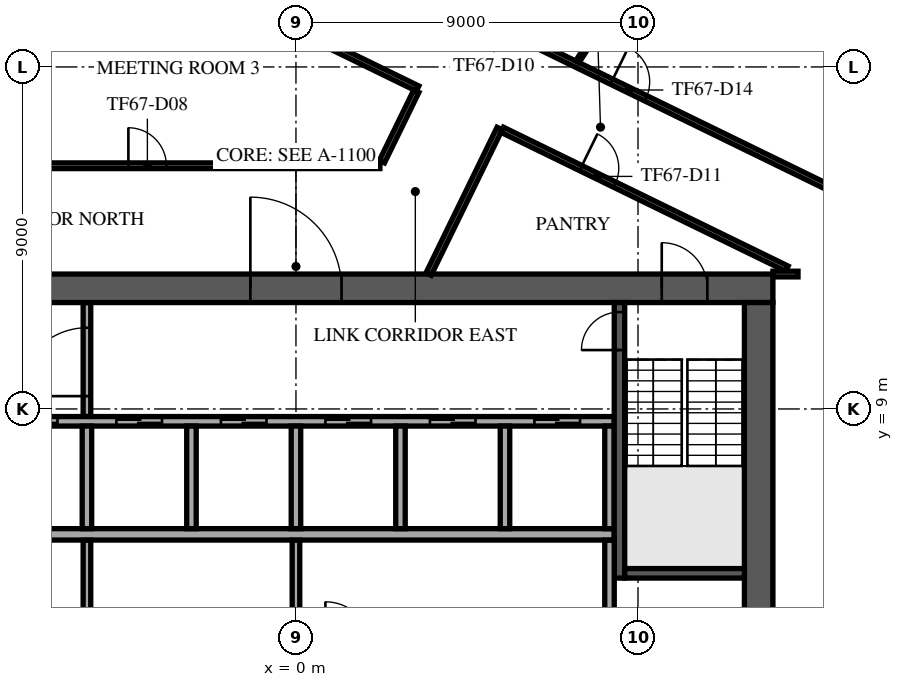
"""IFC4 building model, lengths in metres.
Left out: names, types, materials, properties, quantities, classifications, styles, units other than length and angle.
Written with IfcOpenShell. Run it as: python <this file> out.ifc"""

import sys

from ifc_helpers import new_model, si_unit, direction, frame, frame_2d, origin, place, context, subcontext, project, spatial, rectangle, extrude, element, fill, save


model = new_model("IFC4")
c1 = context("Model", 3, precision=1e-05, world=origin(), true_north=direction((0.0, 1.0)))
c2 = subcontext(c1, "Body", "Model", "MODEL_VIEW")
j1 = project(units=[si_unit("LENGTHUNIT", "METRE"), si_unit("PLANEANGLEUNIT", "RADIAN")], contexts=[c1])
p1 = place(None, origin())
s1 = spatial("IfcSite", under=j1, at=p1, CompositionType="ELEMENT")
p2 = place(p1, origin())
s2 = spatial("IfcBuilding", under=s1, at=p2, CompositionType="ELEMENT")
p3 = place(p2, frame((0.0, 0.0, 282.9)))
s3 = spatial("IfcBuildingStorey", under=s2, at=p3, CompositionType="ELEMENT", Elevation=282.9)
p4 = place(p3, frame((-12.55, 12.175, 0.0), z_axis=(0.0, 0.0, 1.0), x_axis=(1.0, 0.0, 0.0)))
e1 = element("IfcWall", 1, at=p4, inside=s3, PredefinedType="SHEAR", context=c2, shape_type="SweptSolid", body=[
    extrude(rectangle(XDim=25.1, YDim=0.75, at=frame_2d((12.55, 0.0))), origin(), (0.0, 0.0, 1.0), 3.64),
])
p5 = place(p4, frame((11.35, 0.0, 0.0)))
e2 = element("IfcOpeningElement", 2, at=p5, cuts=e1, PredefinedType="OPENING", context=c2, shape_type="SweptSolid", body=[
    extrude(rectangle(XDim=2.4, YDim=2.4, at=frame_2d((1.2, 1.2))), frame((0.0, 0.385, 0.0), z_axis=(0.0, -1.0, 0.0), x_axis=(1.0, 0.0, 0.0)), (0.0, 0.0, 1.0), 0.77),
])
p6 = place(p4, frame((22.175, 0.0, 0.0)))
e3 = element("IfcOpeningElement", 3, at=p6, cuts=e1, PredefinedType="OPENING", context=c2, shape_type="SweptSolid", body=[
    extrude(rectangle(XDim=1.2, YDim=2.1, at=frame_2d((0.6, 1.05))), frame((0.0, 0.385, 0.0), z_axis=(0.0, -1.0, 0.0), x_axis=(1.0, 0.0, 0.0)), (0.0, 0.0, 1.0), 0.77),
])
p7 = place(p4, frame((1.15, 0.0, 0.0)))
e4 = element("IfcOpeningElement", 4, at=p7, cuts=e1, PredefinedType="OPENING", context=c2, shape_type="SweptSolid", body=[
    extrude(rectangle(XDim=1.0, YDim=2.1, at=frame_2d((0.5, 1.05))), frame((0.0, 0.385, 0.0), z_axis=(0.0, -1.0, 0.0), x_axis=(1.0, 0.0, 0.0)), (0.0, 0.0, 1.0), 0.77),
])
p8 = place(p3, frame((12.175, -11.8, 0.0), z_axis=(0.0, 0.0, 1.0), x_axis=(0.0, 1.0, 0.0)))
e5 = element("IfcWall", 5, at=p8, inside=s3, PredefinedType="SHEAR", context=c2, shape_type="SweptSolid", body=[
    extrude(rectangle(XDim=23.6, YDim=0.75, at=frame_2d((11.8, 0.0))), origin(), (0.0, 0.0, 1.0), 3.64),
])
p9 = place(p8, frame((10.6, 0.0, 0.0)))
e6 = element("IfcOpeningElement", 6, at=p9, cuts=e5, PredefinedType="OPENING", context=c2, shape_type="SweptSolid", body=[
    extrude(rectangle(XDim=2.4, YDim=2.4, at=frame_2d((1.2, 1.2))), frame((0.0, 0.385, 0.0), z_axis=(0.0, -1.0, 0.0), x_axis=(1.0, 0.0, 0.0)), (0.0, 0.0, 1.0), 0.77),
])
p10 = place(p3, frame((-8.375, 5.7, 0.0), z_axis=(0.0, 0.0, 1.0), x_axis=(1.0, 0.0, 0.0)))
e7 = element("IfcWall", 7, at=p10, inside=s3, PredefinedType="SOLIDWALL", context=c2, shape_type="SweptSolid", body=[
    extrude(rectangle(XDim=16.75, YDim=0.3, at=frame_2d((8.375, 0.0))), origin(), (0.0, 0.0, 1.0), 3.64),
])
p11 = place(p3, frame((-8.375, 8.675, 0.0), z_axis=(0.0, 0.0, 1.0), x_axis=(1.0, 0.0, 0.0)))
e8 = element("IfcWall", 8, at=p11, inside=s3, PredefinedType="SOLIDWALL", context=c2, shape_type="SweptSolid", body=[
    extrude(rectangle(XDim=16.75, YDim=0.25, at=frame_2d((8.375, 0.0))), origin(), (0.0, 0.0, 1.0), 3.64),
])
p12 = place(p11, frame((0.9, 0.0, 0.0)))
e9 = element("IfcOpeningElement", 9, at=p12, cuts=e8, PredefinedType="OPENING", context=c2, shape_type="SweptSolid", body=[
    extrude(rectangle(XDim=1.2, YDim=2.1, at=frame_2d((0.6, 1.05))), frame((0.0, 0.135, 0.0), z_axis=(0.0, -1.0, 0.0), x_axis=(1.0, 0.0, 0.0)), (0.0, 0.0, 1.0), 0.27),
])
p13 = place(p11, frame((3.65, 0.0, 0.0)))
e10 = element("IfcOpeningElement", 10, at=p13, cuts=e8, PredefinedType="OPENING", context=c2, shape_type="SweptSolid", body=[
    extrude(rectangle(XDim=1.2, YDim=2.1, at=frame_2d((0.6, 1.05))), frame((0.0, 0.135, 0.0), z_axis=(0.0, -1.0, 0.0), x_axis=(1.0, 0.0, 0.0)), (0.0, 0.0, 1.0), 0.27),
])
p14 = place(p11, frame((6.4, 0.0, 0.0)))
e11 = element("IfcOpeningElement", 11, at=p14, cuts=e8, PredefinedType="OPENING", context=c2, shape_type="SweptSolid", body=[
    extrude(rectangle(XDim=1.2, YDim=2.1, at=frame_2d((0.6, 1.05))), frame((0.0, 0.135, 0.0), z_axis=(0.0, -1.0, 0.0), x_axis=(1.0, 0.0, 0.0)), (0.0, 0.0, 1.0), 0.27),
])
p15 = place(p11, frame((9.15, 0.0, 0.0)))
e12 = element("IfcOpeningElement", 12, at=p15, cuts=e8, PredefinedType="OPENING", context=c2, shape_type="SweptSolid", body=[
    extrude(rectangle(XDim=1.2, YDim=2.1, at=frame_2d((0.6, 1.05))), frame((0.0, 0.135, 0.0), z_axis=(0.0, -1.0, 0.0), x_axis=(1.0, 0.0, 0.0)), (0.0, 0.0, 1.0), 0.27),
])
p16 = place(p11, frame((11.9, 0.0, 0.0)))
e13 = element("IfcOpeningElement", 13, at=p16, cuts=e8, PredefinedType="OPENING", context=c2, shape_type="SweptSolid", body=[
    extrude(rectangle(XDim=1.2, YDim=2.1, at=frame_2d((0.6, 1.05))), frame((0.0, 0.135, 0.0), z_axis=(0.0, -1.0, 0.0), x_axis=(1.0, 0.0, 0.0)), (0.0, 0.0, 1.0), 0.27),
])
p17 = place(p11, frame((14.65, 0.0, 0.0)))
e14 = element("IfcOpeningElement", 14, at=p17, cuts=e8, PredefinedType="OPENING", context=c2, shape_type="SweptSolid", body=[
    extrude(rectangle(XDim=1.2, YDim=2.1, at=frame_2d((0.6, 1.05))), frame((0.0, 0.135, 0.0), z_axis=(0.0, -1.0, 0.0), x_axis=(1.0, 0.0, 0.0)), (0.0, 0.0, 1.0), 0.27),
])
for number, where, z_axis, x_axis in (
    (15, (-5.5, 5.85, 0.0), (0.0, 0.0, 1.0), (0.0, 1.0, 0.0)),
    (16, (-2.75, 5.85, 0.0), (0.0, 0.0, 1.0), (0.0, 1.0, 0.0)),
    (17, (0.0, 5.85, 0.0), (0.0, 0.0, 1.0), (0.0, 1.0, 0.0)),
    (18, (2.75, 5.85, 0.0), (0.0, 0.0, 1.0), (0.0, 1.0, 0.0)),
    (19, (5.5, 5.85, 0.0), (0.0, 0.0, 1.0), (0.0, 1.0, 0.0)),
    (20, (8.25, 5.85, 0.0), (0.0, 0.0, 1.0), (0.0, 1.0, 0.0)),
):
    element("IfcWall", number, at=place(p3, frame(where, z_axis=z_axis, x_axis=x_axis)), inside=s3, PredefinedType="SOLIDWALL", context=c2, shape_type="SweptSolid", body=[
        extrude(rectangle(XDim=2.7, YDim=0.25, at=frame_2d((1.35, 0.0))), origin(), (0.0, 0.0, 1.0), 3.64),
    ])
p18 = place(p3, frame((8.512, 4.55, 0.0), z_axis=(0.0, 0.0, 1.0), x_axis=(0.0, 1.0, 0.0)))
e21 = element("IfcWall", 21, at=p18, inside=s3, PredefinedType="SOLIDWALL", context=c2, shape_type="SweptSolid", body=[
    extrude(rectangle(XDim=7.25, YDim=0.275, at=frame_2d((3.625, 0.0))), origin(), (0.0, 0.0, 1.0), 3.64),
])
p19 = place(p18, frame((6.0, 0.0, 0.0)))
e22 = element("IfcOpeningElement", 22, at=p19, cuts=e21, PredefinedType="OPENING", context=c2, shape_type="SweptSolid", body=[
    extrude(rectangle(XDim=1.0, YDim=2.1, at=frame_2d((0.5, 1.05))), frame((0.0, 0.147, 0.0), z_axis=(0.0, -1.0, 0.0), x_axis=(1.0, 0.0, 0.0)), (0.0, 0.0, 1.0), 0.295),
])
p20 = place(p3, frame((8.65, 4.675, 0.0), z_axis=(0.0, 0.0, 1.0), x_axis=(1.0, 0.0, 0.0)))
e23 = element("IfcWall", 23, at=p20, inside=s3, PredefinedType="SOLIDWALL", context=c2, shape_type="SweptSolid", body=[
    extrude(rectangle(XDim=3.15, YDim=0.25, at=frame_2d((1.575, 0.0))), origin(), (0.0, 0.0, 1.0), 3.64),
])
for number, where, z_axis, x_axis in (
    (24, (-5.5, 2.855, 0.0), (0.0, 0.0, 1.0), (0.0, 1.0, 0.0)),
    (25, (0.0, 2.855, 0.0), (0.0, 0.0, 1.0), (0.0, 1.0, 0.0)),
):
    element("IfcWall", number, at=place(p3, frame(where, z_axis=z_axis, x_axis=x_axis)), inside=s3, PredefinedType="PARTITIONING", context=c2, shape_type="SweptSolid", body=[
        extrude(rectangle(XDim=2.69, YDim=0.2, at=frame_2d((1.345, 0.0))), origin(), (0.0, 0.0, 1.0), 3.64),
    ])
p21 = place(p3, frame((8.25, 2.855, 0.0), z_axis=(0.0, 0.0, 1.0), x_axis=(0.0, 1.0, 0.0)))
e26 = element("IfcWall", 26, at=p21, inside=s3, PredefinedType="PARTITIONING", context=c2, shape_type="SweptSolid", body=[
    extrude(rectangle(XDim=2.69, YDim=0.25, at=frame_2d((1.345, 0.0))), origin(), (0.0, 0.0, 1.0), 3.64),
])
p22 = place(p3, frame((-5.5, 8.805, 0.0), z_axis=(0.0, 0.0, 1.0), x_axis=(0.0, 1.0, 0.0)))
e27 = element("IfcWall", 27, at=p22, inside=s3, PredefinedType="PARTITIONING", context=c2, shape_type="SweptSolid", body=[
    extrude(rectangle(XDim=2.99, YDim=0.2, at=frame_2d((1.495, 0.0))), origin(), (0.0, 0.0, 1.0), 3.64),
])
p23 = place(p22, frame((0.532, 0.0, 0.0)))
e28 = element("IfcOpeningElement", 28, at=p23, cuts=e27, PredefinedType="OPENING", context=c2, shape_type="SweptSolid", body=[
    extrude(rectangle(XDim=1.8, YDim=2.1, at=frame_2d((0.9, 1.05))), frame((0.0, 0.11, 0.0), z_axis=(0.0, -1.0, 0.0), x_axis=(1.0, 0.0, 0.0)), (0.0, 0.0, 1.0), 0.22),
])
p24 = place(p3, frame((10.36, -32.137, 0.0), z_axis=(0.0, 0.0, 1.0), x_axis=(0.438372256832, 0.898793504894, 0.0)))
e29 = element("IfcWall", 29, at=p24, inside=s3, PredefinedType="STANDARD", context=c2, shape_type="SweptSolid", body=[
    extrude(rectangle(XDim=48.687, YDim=0.6, at=frame_2d((24.343, 0.0))), origin(), (0.0, 0.0, 1.0), 3.64),
])
p25 = place(p24, frame((1.213, 0.0, 0.9)))
e30 = element("IfcOpeningElement", 30, at=p25, cuts=e29, PredefinedType="OPENING", context=c2, shape_type="SweptSolid", body=[
    extrude(rectangle(XDim=2.0, YDim=2.1, at=frame_2d((1.0, 1.05))), frame((0.0, 0.31, 0.0), z_axis=(0.0, -1.0, 0.0), x_axis=(1.0, 0.0, 0.0)), (0.0, 0.0, 1.0), 0.62),
])
p26 = place(p24, frame((5.639, 0.0, 0.9)))
e31 = element("IfcOpeningElement", 31, at=p26, cuts=e29, PredefinedType="OPENING", context=c2, shape_type="SweptSolid", body=[
    extrude(rectangle(XDim=2.0, YDim=2.1, at=frame_2d((1.0, 1.05))), frame((0.0, 0.31, 0.0), z_axis=(0.0, -1.0, 0.0), x_axis=(1.0, 0.0, 0.0)), (0.0, 0.0, 1.0), 0.62),
])
p27 = place(p24, frame((10.065, 0.0, 0.9)))
e32 = element("IfcOpeningElement", 32, at=p27, cuts=e29, PredefinedType="OPENING", context=c2, shape_type="SweptSolid", body=[
    extrude(rectangle(XDim=2.0, YDim=2.1, at=frame_2d((1.0, 1.05))), frame((0.0, 0.31, 0.0), z_axis=(0.0, -1.0, 0.0), x_axis=(1.0, 0.0, 0.0)), (0.0, 0.0, 1.0), 0.62),
])
p28 = place(p24, frame((14.491, 0.0, 0.9)))
e33 = element("IfcOpeningElement", 33, at=p28, cuts=e29, PredefinedType="OPENING", context=c2, shape_type="SweptSolid", body=[
    extrude(rectangle(XDim=2.0, YDim=2.1, at=frame_2d((1.0, 1.05))), frame((0.0, 0.31, 0.0), z_axis=(0.0, -1.0, 0.0), x_axis=(1.0, 0.0, 0.0)), (0.0, 0.0, 1.0), 0.62),
])
p29 = place(p24, frame((18.917, 0.0, 0.9)))
e34 = element("IfcOpeningElement", 34, at=p29, cuts=e29, PredefinedType="OPENING", context=c2, shape_type="SweptSolid", body=[
    extrude(rectangle(XDim=2.0, YDim=2.1, at=frame_2d((1.0, 1.05))), frame((0.0, 0.31, 0.0), z_axis=(0.0, -1.0, 0.0), x_axis=(1.0, 0.0, 0.0)), (0.0, 0.0, 1.0), 0.62),
])
p30 = place(p24, frame((23.343, 0.0, 0.9)))
e35 = element("IfcOpeningElement", 35, at=p30, cuts=e29, PredefinedType="OPENING", context=c2, shape_type="SweptSolid", body=[
    extrude(rectangle(XDim=2.0, YDim=2.1, at=frame_2d((1.0, 1.05))), frame((0.0, 0.31, 0.0), z_axis=(0.0, -1.0, 0.0), x_axis=(1.0, 0.0, 0.0)), (0.0, 0.0, 1.0), 0.62),
])
p31 = place(p24, frame((27.769, 0.0, 0.9)))
e36 = element("IfcOpeningElement", 36, at=p31, cuts=e29, PredefinedType="OPENING", context=c2, shape_type="SweptSolid", body=[
    extrude(rectangle(XDim=2.0, YDim=2.1, at=frame_2d((1.0, 1.05))), frame((0.0, 0.31, 0.0), z_axis=(0.0, -1.0, 0.0), x_axis=(1.0, 0.0, 0.0)), (0.0, 0.0, 1.0), 0.62),
])
p32 = place(p24, frame((32.195, 0.0, 0.9)))
e37 = element("IfcOpeningElement", 37, at=p32, cuts=e29, PredefinedType="OPENING", context=c2, shape_type="SweptSolid", body=[
    extrude(rectangle(XDim=2.0, YDim=2.1, at=frame_2d((1.0, 1.05))), frame((0.0, 0.31, 0.0), z_axis=(0.0, -1.0, 0.0), x_axis=(1.0, 0.0, 0.0)), (0.0, 0.0, 1.0), 0.62),
])
p33 = place(p24, frame((36.621, 0.0, 0.9)))
e38 = element("IfcOpeningElement", 38, at=p33, cuts=e29, PredefinedType="OPENING", context=c2, shape_type="SweptSolid", body=[
    extrude(rectangle(XDim=2.0, YDim=2.1, at=frame_2d((1.0, 1.05))), frame((0.0, 0.31, 0.0), z_axis=(0.0, -1.0, 0.0), x_axis=(1.0, 0.0, 0.0)), (0.0, 0.0, 1.0), 0.62),
])
p34 = place(p24, frame((41.047, 0.0, 0.9)))
e39 = element("IfcOpeningElement", 39, at=p34, cuts=e29, PredefinedType="OPENING", context=c2, shape_type="SweptSolid", body=[
    extrude(rectangle(XDim=2.0, YDim=2.1, at=frame_2d((1.0, 1.05))), frame((0.0, 0.31, 0.0), z_axis=(0.0, -1.0, 0.0), x_axis=(1.0, 0.0, 0.0)), (0.0, 0.0, 1.0), 0.62),
])
p35 = place(p24, frame((45.473, 0.0, 0.9)))
e40 = element("IfcOpeningElement", 40, at=p35, cuts=e29, PredefinedType="OPENING", context=c2, shape_type="SweptSolid", body=[
    extrude(rectangle(XDim=2.0, YDim=2.1, at=frame_2d((1.0, 1.05))), frame((0.0, 0.31, 0.0), z_axis=(0.0, -1.0, 0.0), x_axis=(1.0, 0.0, 0.0)), (0.0, 0.0, 1.0), 0.62),
])
p36 = place(p3, frame((-15.325, 15.4, 0.0), z_axis=(0.0, 0.0, 1.0), x_axis=(1.0, 0.0, 0.0)))
e41 = element("IfcWall", 41, at=p36, inside=s3, PredefinedType="PARTITIONING", context=c2, shape_type="SweptSolid", body=[
    extrude(rectangle(XDim=17.535, YDim=0.15, at=frame_2d((8.768, 0.0))), origin(), (0.0, 0.0, 1.0), 3.24),
])
p37 = place(p36, frame((1.05, 0.0, 0.0)))
e42 = element("IfcOpeningElement", 42, at=p37, cuts=e41, PredefinedType="OPENING", context=c2, shape_type="SweptSolid", body=[
    extrude(rectangle(XDim=1.0, YDim=2.1, at=frame_2d((0.5, 1.05))), frame((0.0, 0.085, 0.0), z_axis=(0.0, -1.0, 0.0), x_axis=(1.0, 0.0, 0.0)), (0.0, 0.0, 1.0), 0.17),
])
p38 = place(p36, frame((10.915, 0.0, 0.0)))
e43 = element("IfcOpeningElement", 43, at=p38, cuts=e41, PredefinedType="OPENING", context=c2, shape_type="SweptSolid", body=[
    extrude(rectangle(XDim=1.0, YDim=2.1, at=frame_2d((0.5, 1.05))), frame((0.0, 0.085, 0.0), z_axis=(0.0, -1.0, 0.0), x_axis=(1.0, 0.0, 0.0)), (0.0, 0.0, 1.0), 0.17),
])
p39 = place(p3, frame((-10.156, 23.947, 0.0), z_axis=(0.0, 0.0, 1.0), x_axis=(0.898773813872, -0.438412626983, 0.0)))
e44 = element("IfcWall", 44, at=p39, inside=s3, PredefinedType="PARTITIONING", context=c2, shape_type="SweptSolid", body=[
    extrude(rectangle(XDim=14.861, YDim=0.15, at=frame_2d((7.43, 0.0))), origin(), (0.0, 0.0, 1.0), 3.04),
])
p40 = place(p3, frame((-9.104, 26.104, 0.0), z_axis=(0.0, 0.0, 1.0), x_axis=(0.898795233888, -0.438368711864, 0.0)))
e45 = element("IfcWall", 45, at=p40, inside=s3, PredefinedType="PARTITIONING", context=c2, shape_type="SweptSolid", body=[
    extrude(rectangle(XDim=39.325, YDim=0.15, at=frame_2d((19.663, 0.0))), origin(), (0.0, 0.0, 1.0), 3.04),
])
p41 = place(p40, frame((2.8, 0.0, 0.0)))
e46 = element("IfcOpeningElement", 46, at=p41, cuts=e45, PredefinedType="OPENING", context=c2, shape_type="SweptSolid", body=[
    extrude(rectangle(XDim=1.8, YDim=2.1, at=frame_2d((0.9, 1.05))), frame((0.0, 0.085, 0.0), z_axis=(0.0, -1.0, 0.0), x_axis=(1.0, 0.0, 0.0)), (0.0, 0.0, 1.0), 0.17),
])
p42 = place(p40, frame((15.419, 0.0, 0.0)))
e47 = element("IfcOpeningElement", 47, at=p42, cuts=e45, PredefinedType="OPENING", context=c2, shape_type="SweptSolid", body=[
    extrude(rectangle(XDim=1.0, YDim=2.1, at=frame_2d((0.5, 1.05))), frame((0.0, 0.085, 0.0), z_axis=(0.0, -1.0, 0.0), x_axis=(1.0, 0.0, 0.0)), (0.0, 0.0, 1.0), 0.17),
])
p43 = place(p40, frame((19.371, 0.0, 0.0)))
e48 = element("IfcOpeningElement", 48, at=p43, cuts=e45, PredefinedType="OPENING", context=c2, shape_type="SweptSolid", body=[
    extrude(rectangle(XDim=1.0, YDim=2.1, at=frame_2d((0.5, 1.05))), frame((0.0, 0.085, 0.0), z_axis=(0.0, -1.0, 0.0), x_axis=(1.0, 0.0, 0.0)), (0.0, 0.0, 1.0), 0.17),
])
p44 = place(p3, frame((2.263, 15.508, 0.0), z_axis=(0.0, 0.0, 1.0), x_axis=(0.438351446917, 0.898803654301, 0.0)))
e49 = element("IfcWall", 49, at=p44, inside=s3, PredefinedType="PARTITIONING", context=c2, shape_type="SweptSolid", body=[
    extrude(rectangle(XDim=2.066, YDim=0.15, at=frame_2d((1.033, 0.0))), origin(), (0.0, 0.0, 1.0), 3.64),
])
p45 = place(p3, frame((3.49, 12.55, 0.0), z_axis=(0.0, 0.0, 1.0), x_axis=(0.438553431108, 0.898705117412, 0.0)))
e50 = element("IfcWall", 50, at=p45, inside=s3, PredefinedType="PARTITIONING", context=c2, shape_type="SweptSolid", body=[
    extrude(rectangle(XDim=4.261, YDim=0.15, at=frame_2d((2.131, 0.0))), origin(), (0.0, 0.0, 1.0), 3.24),
])
p46 = place(p3, frame((5.427, 16.347, 0.0), z_axis=(0.0, 0.0, 1.0), x_axis=(0.898771260275, -0.43841786198, 0.0)))
e51 = element("IfcWall", 51, at=p46, inside=s3, PredefinedType="PARTITIONING", context=c2, shape_type="SweptSolid", body=[
    extrude(rectangle(XDim=8.336, YDim=0.15, at=frame_2d((4.168, 0.0))), origin(), (0.0, 0.0, 1.0), 3.24),
])
p47 = place(p46, frame((2.3, 0.0, 0.0)))
e52 = element("IfcOpeningElement", 52, at=p47, cuts=e51, PredefinedType="OPENING", context=c2, shape_type="SweptSolid", body=[
    extrude(rectangle(XDim=1.0, YDim=2.1, at=frame_2d((0.5, 1.05))), frame((0.0, 0.085, 0.0), z_axis=(0.0, -1.0, 0.0), x_axis=(1.0, 0.0, 0.0)), (0.0, 0.0, 1.0), 0.17),
])
p48 = place(p3, frame((12.55, 12.55, 0.0), z_axis=(0.0, 0.0, 1.0), x_axis=(1.0, 0.0, 0.0)))
e53 = element("IfcWall", 53, at=p48, inside=s3, PredefinedType="PARTITIONING", context=c2, shape_type="SweptSolid", body=[
    extrude(rectangle(XDim=0.661, YDim=0.15, at=frame_2d((0.331, 0.0))), origin(), (0.0, 0.0, 1.0), 3.24),
])
p49 = place(p3, frame((7.408, 18.14, 0.0), z_axis=(0.0, 0.0, 1.0), x_axis=(0.539403798029, 0.842047233041, 0.0)))
e54 = element("IfcWall", 54, at=p49, inside=s3, PredefinedType="PARTITIONING", context=c2, shape_type="SweptSolid", body=[
    extrude(rectangle(XDim=9.913, YDim=0.1, at=frame_2d((4.956, 0.0))), origin(), (0.0, 0.0, 1.0), 3.04),
])
p50 = place(p5, origin())
e55 = element("IfcDoor", 55, at=p50, inside=s3, OperationType="SINGLE_SWING_LEFT", PredefinedType="DOOR", context=c2, shape_type="SweptSolid", body=[
    extrude(rectangle(XDim=2.4, YDim=2.4, at=frame_2d((1.2, 1.2))), frame((0.0, 0.025, 0.0), z_axis=(0.0, -1.0, 0.0), x_axis=(1.0, 0.0, 0.0)), (0.0, 0.0, 1.0), 0.05),
])
fill(e2, e55)
p51 = place(p6, origin())
e56 = element("IfcDoor", 56, at=p51, inside=s3, OperationType="SINGLE_SWING_LEFT", PredefinedType="DOOR", context=c2, shape_type="SweptSolid", body=[
    extrude(rectangle(XDim=1.2, YDim=2.1, at=frame_2d((0.6, 1.05))), frame((0.0, 0.025, 0.0), z_axis=(0.0, -1.0, 0.0), x_axis=(1.0, 0.0, 0.0)), (0.0, 0.0, 1.0), 0.05),
])
fill(e3, e56)
p52 = place(p12, origin())
e57 = element("IfcDoor", 57, at=p52, inside=s3, OperationType="DOUBLE_DOOR_SLIDING", PredefinedType="DOOR", context=c2, shape_type="SweptSolid", body=[
    extrude(rectangle(XDim=1.2, YDim=2.1, at=frame_2d((0.6, 1.05))), frame((0.0, 0.025, 0.0), z_axis=(0.0, -1.0, 0.0), x_axis=(1.0, 0.0, 0.0)), (0.0, 0.0, 1.0), 0.05),
])
fill(e9, e57)
p53 = place(p13, origin())
e58 = element("IfcDoor", 58, at=p53, inside=s3, OperationType="DOUBLE_DOOR_SLIDING", PredefinedType="DOOR", context=c2, shape_type="SweptSolid", body=[
    extrude(rectangle(XDim=1.2, YDim=2.1, at=frame_2d((0.6, 1.05))), frame((0.0, 0.025, 0.0), z_axis=(0.0, -1.0, 0.0), x_axis=(1.0, 0.0, 0.0)), (0.0, 0.0, 1.0), 0.05),
])
fill(e10, e58)
p54 = place(p14, origin())
e59 = element("IfcDoor", 59, at=p54, inside=s3, OperationType="DOUBLE_DOOR_SLIDING", PredefinedType="DOOR", context=c2, shape_type="SweptSolid", body=[
    extrude(rectangle(XDim=1.2, YDim=2.1, at=frame_2d((0.6, 1.05))), frame((0.0, 0.025, 0.0), z_axis=(0.0, -1.0, 0.0), x_axis=(1.0, 0.0, 0.0)), (0.0, 0.0, 1.0), 0.05),
])
fill(e11, e59)
p55 = place(p15, origin())
e60 = element("IfcDoor", 60, at=p55, inside=s3, OperationType="DOUBLE_DOOR_SLIDING", PredefinedType="DOOR", context=c2, shape_type="SweptSolid", body=[
    extrude(rectangle(XDim=1.2, YDim=2.1, at=frame_2d((0.6, 1.05))), frame((0.0, 0.025, 0.0), z_axis=(0.0, -1.0, 0.0), x_axis=(1.0, 0.0, 0.0)), (0.0, 0.0, 1.0), 0.05),
])
fill(e12, e60)
p56 = place(p16, origin())
e61 = element("IfcDoor", 61, at=p56, inside=s3, OperationType="DOUBLE_DOOR_SLIDING", PredefinedType="DOOR", context=c2, shape_type="SweptSolid", body=[
    extrude(rectangle(XDim=1.2, YDim=2.1, at=frame_2d((0.6, 1.05))), frame((0.0, 0.025, 0.0), z_axis=(0.0, -1.0, 0.0), x_axis=(1.0, 0.0, 0.0)), (0.0, 0.0, 1.0), 0.05),
])
fill(e13, e61)
p57 = place(p17, origin())
e62 = element("IfcDoor", 62, at=p57, inside=s3, OperationType="DOUBLE_DOOR_SLIDING", PredefinedType="DOOR", context=c2, shape_type="SweptSolid", body=[
    extrude(rectangle(XDim=1.2, YDim=2.1, at=frame_2d((0.6, 1.05))), frame((0.0, 0.025, 0.0), z_axis=(0.0, -1.0, 0.0), x_axis=(1.0, 0.0, 0.0)), (0.0, 0.0, 1.0), 0.05),
])
fill(e14, e62)
p58 = place(p19, origin())
e63 = element("IfcDoor", 63, at=p58, inside=s3, OperationType="SINGLE_SWING_LEFT", PredefinedType="DOOR", context=c2, shape_type="SweptSolid", body=[
    extrude(rectangle(XDim=1.0, YDim=2.1, at=frame_2d((0.5, 1.05))), frame((0.0, 0.025, 0.0), z_axis=(0.0, -1.0, 0.0), x_axis=(1.0, 0.0, 0.0)), (0.0, 0.0, 1.0), 0.05),
])
fill(e22, e63)
p59 = place(p23, origin())
e64 = element("IfcDoor", 64, at=p59, inside=s3, OperationType="SINGLE_SWING_LEFT", PredefinedType="DOOR", context=c2, shape_type="SweptSolid", body=[
    extrude(rectangle(XDim=1.8, YDim=2.1, at=frame_2d((0.9, 1.05))), frame((0.0, 0.025, 0.0), z_axis=(0.0, -1.0, 0.0), x_axis=(1.0, 0.0, 0.0)), (0.0, 0.0, 1.0), 0.05),
])
fill(e28, e64)
p60 = place(p38, origin())
e65 = element("IfcDoor", 65, at=p60, inside=s3, OperationType="SINGLE_SWING_RIGHT", PredefinedType="DOOR", context=c2, shape_type="SweptSolid", body=[
    extrude(rectangle(XDim=1.0, YDim=2.1, at=frame_2d((0.5, 1.05))), frame((0.0, 0.025, 0.0), z_axis=(0.0, -1.0, 0.0), x_axis=(1.0, 0.0, 0.0)), (0.0, 0.0, 1.0), 0.05),
])
fill(e43, e65)
p61 = place(p47, frame((1.0, 0.0, 0.0), z_axis=(0.0, 0.0, 1.0), x_axis=(-1.0, 0.0, 0.0)))
e66 = element("IfcDoor", 66, at=p61, inside=s3, OperationType="SINGLE_SWING_RIGHT", PredefinedType="DOOR", context=c2, shape_type="SweptSolid", body=[
    extrude(rectangle(XDim=1.0, YDim=2.1, at=frame_2d((0.5, 1.05))), frame((0.0, 0.025, 0.0), z_axis=(0.0, -1.0, 0.0), x_axis=(1.0, 0.0, 0.0)), (0.0, 0.0, 1.0), 0.05),
])
fill(e52, e66)
p62 = place(p43, origin())
e67 = element("IfcDoor", 67, at=p62, inside=s3, OperationType="SINGLE_SWING_RIGHT", PredefinedType="DOOR", context=c2, shape_type="SweptSolid", body=[
    extrude(rectangle(XDim=1.0, YDim=2.1, at=frame_2d((0.5, 1.05))), frame((0.0, 0.025, 0.0), z_axis=(0.0, -1.0, 0.0), x_axis=(1.0, 0.0, 0.0)), (0.0, 0.0, 1.0), 0.05),
])
fill(e48, e67)
save(model, sys.argv[1])
